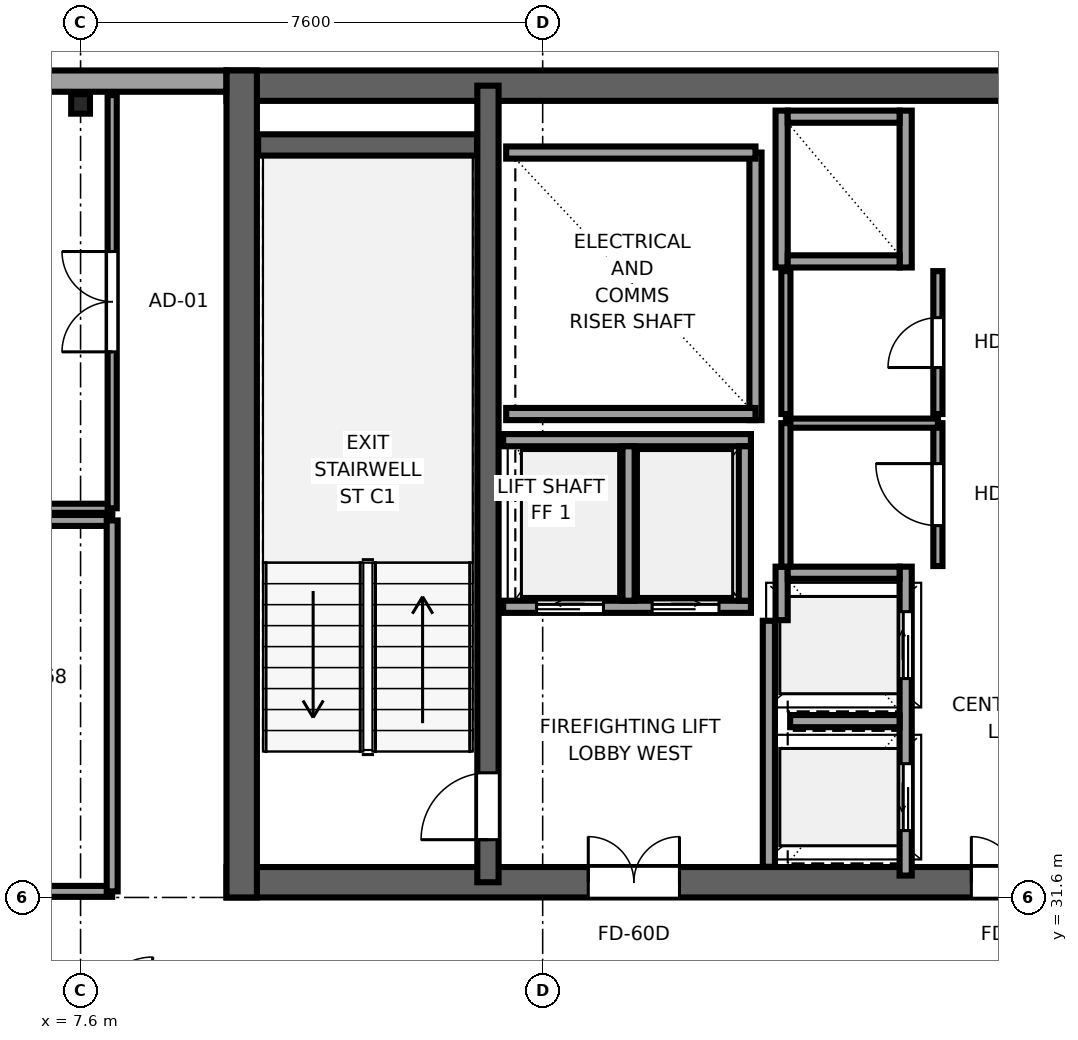
"""IFC4 building model, lengths in metres.
Left out: names, types, materials, properties, quantities, classifications, styles, units other than length and angle.
Written with IfcOpenShell. Run it as: python <this file> out.ifc"""

import sys

from ifc_helpers import new_model, si_unit, direction, frame, frame_2d, origin, origin_2d, place, context, subcontext, project, spatial, rectangle, i_section, extrude, source, transform, mapped, element, fill, save


model = new_model("IFC4")
c1 = context("Model", 3, precision=1e-05, world=origin(), true_north=direction((0.0, 1.0)))
c2 = subcontext(c1, "Body", "Model", "MODEL_VIEW")
j1 = project(units=[si_unit("LENGTHUNIT", "METRE"), si_unit("PLANEANGLEUNIT", "RADIAN")], contexts=[c1])
p1 = place(None, origin())
s1 = spatial("IfcSite", under=j1, at=p1, CompositionType="ELEMENT")
p2 = place(p1, origin())
s2 = spatial("IfcBuilding", under=s1, at=p2, CompositionType="ELEMENT")
p3 = place(p2, frame((0.0, 0.0, 255.85)))
s3 = spatial("IfcBuildingStorey", under=s2, at=p3, CompositionType="ELEMENT", Elevation=255.85)
p4 = place(p3, frame((10.0, 31.85, 0.0), z_axis=(0.0, 0.0, 1.0), x_axis=(1.0, 0.0, 0.0)))
e1 = element("IfcWall", 1, at=p4, inside=s3, PredefinedType="SHEAR", context=c2, shape_type="SweptSolid", body=[
    extrude(rectangle(XDim=26.0, YDim=0.5, at=frame_2d((13.0, 0.0))), origin(), (0.0, 0.0, 1.0), 3.55),
])
p5 = place(p4, frame((7.45, 0.0, 0.0), z_axis=(0.0, 0.0, 1.0), x_axis=(-1.0, 0.0, 0.0)))
e2 = element("IfcOpeningElement", 2, at=p5, cuts=e1, PredefinedType="OPENING", context=c2, shape_type="SweptSolid", body=[
    extrude(rectangle(XDim=1.5, YDim=2.04, at=frame_2d((0.75, 1.02))), frame((0.0, 0.26, 0.0), z_axis=(0.0, -1.0, 0.0), x_axis=(1.0, 0.0, 0.0)), (0.0, 0.0, 1.0), 0.52),
])
p6 = place(p4, frame((13.75, 0.0, 0.0), z_axis=(0.0, 0.0, 1.0), x_axis=(-1.0, 0.0, 0.0)))
e3 = element("IfcOpeningElement", 3, at=p6, cuts=e1, PredefinedType="OPENING", context=c2, shape_type="SweptSolid", body=[
    extrude(rectangle(XDim=1.5, YDim=2.04, at=frame_2d((0.75, 1.02))), frame((0.0, 0.26, 0.0), z_axis=(0.0, -1.0, 0.0), x_axis=(1.0, 0.0, 0.0)), (0.0, 0.0, 1.0), 0.52),
])
p7 = place(p4, frame((20.05, 0.0, 0.0), z_axis=(0.0, 0.0, 1.0), x_axis=(-1.0, 0.0, 0.0)))
e4 = element("IfcOpeningElement", 4, at=p7, cuts=e1, PredefinedType="OPENING", context=c2, shape_type="SweptSolid", body=[
    extrude(rectangle(XDim=1.5, YDim=2.04, at=frame_2d((0.75, 1.02))), frame((0.0, 0.26, 0.0), z_axis=(0.0, -1.0, 0.0), x_axis=(1.0, 0.0, 0.0)), (0.0, 0.0, 1.0), 0.52),
])
p8 = place(p3, frame((10.0, 44.95, 0.0), z_axis=(0.0, 0.0, 1.0), x_axis=(1.0, 0.0, 0.0)))
e5 = element("IfcWall", 5, at=p8, inside=s3, PredefinedType="SHEAR", context=c2, shape_type="SweptSolid", body=[
    extrude(rectangle(XDim=26.0, YDim=0.5, at=frame_2d((13.0, 0.0))), origin(), (0.0, 0.0, 1.0), 3.55),
])
p9 = place(p3, frame((10.25, 31.6, 0.0), z_axis=(0.0, 0.0, 1.0), x_axis=(0.0, 1.0, 0.0)))
e6 = element("IfcWall", 6, at=p9, inside=s3, PredefinedType="SHEAR", context=c2, shape_type="SweptSolid", body=[
    extrude(rectangle(XDim=13.6, YDim=0.5, at=frame_2d((6.8, 0.0))), origin(), (0.0, 0.0, 1.0), 3.55),
])
p10 = place(p3, frame((14.3, 31.85, 0.0), z_axis=(0.0, 0.0, 1.0), x_axis=(0.0, 1.0, 0.0)))
e7 = element("IfcWall", 7, at=p10, inside=s3, PredefinedType="SHEAR", context=c2, shape_type="SweptSolid", body=[
    extrude(rectangle(XDim=13.1, YDim=0.35, at=frame_2d((6.55, 0.0))), origin(), (0.0, 0.0, 1.0), 3.55),
])
p11 = place(p10, frame((0.7, 0.0, 0.0)))
e8 = element("IfcOpeningElement", 8, at=p11, cuts=e7, PredefinedType="OPENING", context=c2, shape_type="SweptSolid", body=[
    extrude(rectangle(XDim=1.1, YDim=2.12, at=frame_2d((0.55, 1.06))), frame((0.0, 0.185, 0.0), z_axis=(0.0, -1.0, 0.0), x_axis=(1.0, 0.0, 0.0)), (0.0, 0.0, 1.0), 0.37),
])
p12 = place(p3, frame((10.52, 43.975, 0.0), z_axis=(0.0, 0.0, 1.0), x_axis=(1.0, 0.0, 0.0)))
e9 = element("IfcWall", 9, at=p12, inside=s3, PredefinedType="SHEAR", context=c2, shape_type="SweptSolid", body=[
    extrude(rectangle(XDim=3.6, YDim=0.35, at=frame_2d((1.8, 0.0))), origin(), (0.0, 0.0, 1.0), 3.55),
])
m1 = source(origin(), c2, "Body", "SweptSolid", [
    extrude(i_section(OverallWidth=0.309, OverallDepth=0.321, WebThickness=0.014, FlangeThickness=0.022, FilletRadius=0.017, at=origin_2d()), origin(), (0.0, 0.0, 1.0), 3.55),
])
p13 = place(p3, frame((7.6, 44.65, 0.0), z_axis=(0.0, 0.0, 1.0), x_axis=(1.0, 0.0, 0.0)))
e10 = element("IfcColumn", 10, at=p13, inside=s3, PredefinedType="COLUMN", context=c2, shape_type="MappedRepresentation", body=[
    mapped(m1, transform((0.0, 0.0, 0.0), x_axis=(1.0, 0.0, 0.0), y_axis=(0.0, 1.0, 0.0), z_axis=(0.0, 0.0, 1.0), scale=1.0)),
])
p14 = place(p3, frame((9.996, 45.025, 0.0), z_axis=(0.0, 0.0, 1.0), x_axis=(-1.0, 0.0, 0.0)))
e11 = element("IfcWall", 11, at=p14, inside=s3, PredefinedType="SOLIDWALL", context=c2, shape_type="SweptSolid", body=[
    extrude(rectangle(XDim=2.979, YDim=0.35, at=frame_2d((1.49, 0.0))), origin(), (0.0, 0.0, 1.0), 2.16),
])
p15 = place(p3, frame((18.7, 39.45, 0.0), z_axis=(0.0, 0.0, 1.0), x_axis=(0.0, 1.0, 0.0)))
e12 = element("IfcWall", 12, at=p15, inside=s3, PredefinedType="SOLIDWALL", context=c2, shape_type="SweptSolid", body=[
    extrude(rectangle(XDim=4.4, YDim=0.2, at=frame_2d((2.2, 0.0))), origin(), (0.0, 0.0, 1.0), 3.37),
])
for number, where, z_axis, x_axis in (
    (13, (14.6, 39.55, 0.0), (0.0, 0.0, 1.0), (1.0, 0.0, 0.0)),
    (14, (14.6, 43.85, 0.0), (0.0, 0.0, 1.0), (1.0, 0.0, 0.0)),
):
    element("IfcWall", number, at=place(p3, frame(where, z_axis=z_axis, x_axis=x_axis)), inside=s3, PredefinedType="SOLIDWALL", context=c2, shape_type="SweptSolid", body=[
        extrude(rectangle(XDim=4.1, YDim=0.2, at=frame_2d((2.05, 0.0))), origin(), (0.0, 0.0, 1.0), 3.37),
    ])
p16 = place(p3, frame((18.92, 32.104, 0.0), z_axis=(0.0, 0.0, 1.0), x_axis=(0.0, 1.0, 0.0)))
e15 = element("IfcWall", 15, at=p16, inside=s3, PredefinedType="SOLIDWALL", context=c2, shape_type="SweptSolid", body=[
    extrude(rectangle(XDim=4.046, YDim=0.2, at=frame_2d((2.023, 0.0))), origin(), (0.0, 0.0, 1.0), 3.37),
])
p17 = place(p3, frame((21.17, 31.96, 0.0), z_axis=(0.0, 0.0, 1.0), x_axis=(0.0, 1.0, 0.0)))
e16 = element("IfcWall", 16, at=p17, inside=s3, PredefinedType="SOLIDWALL", context=c2, shape_type="SweptSolid", body=[
    extrude(rectangle(XDim=5.08, YDim=0.2, at=frame_2d((2.54, 0.0))), origin(), (0.0, 0.0, 1.0), 3.37),
])
p18 = place(p17, frame((0.74, 0.0, 0.0)))
e17 = element("IfcOpeningElement", 17, at=p18, cuts=e16, PredefinedType="OPENING", context=c2, shape_type="SweptSolid", body=[
    extrude(rectangle(XDim=1.1, YDim=2.12, at=frame_2d((0.55, 1.06))), frame((0.0, 0.11, 0.0), z_axis=(0.0, -1.0, 0.0), x_axis=(1.0, 0.0, 0.0)), (0.0, 0.0, 1.0), 0.22),
])
p19 = place(p17, frame((3.24, 0.0, 0.0)))
e18 = element("IfcOpeningElement", 18, at=p19, cuts=e16, PredefinedType="OPENING", context=c2, shape_type="SweptSolid", body=[
    extrude(rectangle(XDim=1.1, YDim=2.12, at=frame_2d((0.55, 1.06))), frame((0.0, 0.11, 0.0), z_axis=(0.0, -1.0, 0.0), x_axis=(1.0, 0.0, 0.0)), (0.0, 0.0, 1.0), 0.22),
])
p20 = place(p3, frame((19.13, 36.16, 0.0), z_axis=(0.0, 0.0, 1.0), x_axis=(0.0, 1.0, 0.0)))
e19 = element("IfcWall", 19, at=p20, inside=s3, PredefinedType="SOLIDWALL", context=c2, shape_type="SweptSolid", body=[
    extrude(rectangle(XDim=0.88, YDim=0.2, at=frame_2d((0.44, 0.0))), origin(), (0.0, 0.0, 1.0), 3.37),
])
p21 = place(p3, frame((19.23, 36.94, 0.0), z_axis=(0.0, 0.0, 1.0), x_axis=(1.0, 0.0, 0.0)))
e20 = element("IfcWall", 20, at=p21, inside=s3, PredefinedType="SOLIDWALL", context=c2, shape_type="SweptSolid", body=[
    extrude(rectangle(XDim=1.84, YDim=0.2, at=frame_2d((0.92, 0.0))), origin(), (0.0, 0.0, 1.0), 3.37),
])
p22 = place(p3, frame((19.27, 34.5, 0.0), z_axis=(0.0, 0.0, 1.0), x_axis=(1.0, 0.0, 0.0)))
e21 = element("IfcWall", 21, at=p22, inside=s3, PredefinedType="SOLIDWALL", context=c2, shape_type="SweptSolid", body=[
    extrude(rectangle(XDim=1.8, YDim=0.2, at=frame_2d((0.9, 0.0))), origin(), (0.0, 0.0, 1.0), 3.37),
])
for number, where, z_axis, x_axis in (
    (22, (21.17, 41.96, 0.0), (0.0, 0.0, 1.0), (0.0, 1.0, 0.0)),
    (23, (19.13, 41.96, 0.0), (0.0, 0.0, 1.0), (0.0, 1.0, 0.0)),
):
    element("IfcWall", number, at=place(p3, frame(where, z_axis=z_axis, x_axis=x_axis)), inside=s3, PredefinedType="SOLIDWALL", context=c2, shape_type="SweptSolid", body=[
        extrude(rectangle(XDim=2.58, YDim=0.2, at=frame_2d((1.29, 0.0))), origin(), (0.0, 0.0, 1.0), 3.37),
    ])
for number, where, z_axis, x_axis in (
    (24, (19.23, 42.06, 0.0), (0.0, 0.0, 1.0), (1.0, 0.0, 0.0)),
    (25, (19.23, 44.44, 0.0), (0.0, 0.0, 1.0), (1.0, 0.0, 0.0)),
):
    element("IfcWall", number, at=place(p3, frame(where, z_axis=z_axis, x_axis=x_axis)), inside=s3, PredefinedType="SOLIDWALL", context=c2, shape_type="SweptSolid", body=[
        extrude(rectangle(XDim=1.84, YDim=0.2, at=frame_2d((0.92, 0.0))), origin(), (0.0, 0.0, 1.0), 3.37),
    ])
p23 = place(p3, frame((14.55, 36.38, 0.0), z_axis=(0.0, 0.0, 1.0), x_axis=(1.0, 0.0, 0.0)))
e26 = element("IfcWall", 26, at=p23, inside=s3, PredefinedType="SOLIDWALL", context=c2, shape_type="SweptSolid", body=[
    extrude(rectangle(XDim=4.075, YDim=0.2, at=frame_2d((2.038, 0.0))), origin(), (0.0, 0.0, 1.0), 3.37),
])
p24 = place(p23, frame((0.55, 0.0, 0.0)))
e27 = element("IfcOpeningElement", 27, at=p24, cuts=e26, PredefinedType="OPENING", context=c2, shape_type="SweptSolid", body=[
    extrude(rectangle(XDim=1.1, YDim=2.12, at=frame_2d((0.55, 1.06))), frame((0.0, 0.11, 0.0), z_axis=(0.0, -1.0, 0.0), x_axis=(1.0, 0.0, 0.0)), (0.0, 0.0, 1.0), 0.22),
])
p25 = place(p23, frame((2.45, 0.0, 0.0)))
e28 = element("IfcOpeningElement", 28, at=p25, cuts=e26, PredefinedType="OPENING", context=c2, shape_type="SweptSolid", body=[
    extrude(rectangle(XDim=1.1, YDim=2.12, at=frame_2d((0.55, 1.06))), frame((0.0, 0.11, 0.0), z_axis=(0.0, -1.0, 0.0), x_axis=(1.0, 0.0, 0.0)), (0.0, 0.0, 1.0), 0.22),
])
p26 = place(p3, frame((14.55, 39.12, 0.0), z_axis=(0.0, 0.0, 1.0), x_axis=(1.0, 0.0, 0.0)))
e29 = element("IfcWall", 29, at=p26, inside=s3, PredefinedType="SOLIDWALL", context=c2, shape_type="SweptSolid", body=[
    extrude(rectangle(XDim=4.075, YDim=0.2, at=frame_2d((2.038, 0.0))), origin(), (0.0, 0.0, 1.0), 3.37),
])
for number, where, z_axis, x_axis in (
    (30, (18.525, 36.48, 0.0), (0.0, 0.0, 1.0), (0.0, 1.0, 0.0)),
    (31, (16.613, 36.48, 0.0), (0.0, 0.0, 1.0), (0.0, 1.0, 0.0)),
):
    element("IfcWall", number, at=place(p3, frame(where, z_axis=z_axis, x_axis=x_axis)), inside=s3, PredefinedType="SOLIDWALL", context=c2, shape_type="SweptSolid", body=[
        extrude(rectangle(XDim=2.54, YDim=0.2, at=frame_2d((1.27, 0.0))), origin(), (0.0, 0.0, 1.0), 3.37),
    ])
p27 = place(p3, frame((21.7, 37.05, 0.0), z_axis=(0.0, 0.0, 1.0), x_axis=(0.0, 1.0, 0.0)))
e32 = element("IfcWall", 32, at=p27, inside=s3, PredefinedType="PARTITIONING", context=c2, shape_type="SweptSolid", body=[
    extrude(rectangle(XDim=2.35, YDim=0.15, at=frame_2d((1.175, 0.0))), origin(), (0.0, 0.0, 1.0), 3.37),
])
p28 = place(p27, frame((0.665, 0.0, 0.0)))
e33 = element("IfcOpeningElement", 33, at=p28, cuts=e32, PredefinedType="OPENING", context=c2, shape_type="SweptSolid", body=[
    extrude(rectangle(XDim=1.02, YDim=2.03, at=frame_2d((0.51, 1.015))), frame((0.0, 0.085, 0.0), z_axis=(0.0, -1.0, 0.0), x_axis=(1.0, 0.0, 0.0)), (0.0, 0.0, 1.0), 0.17),
])
p29 = place(p3, frame((19.2, 39.4, 0.0), z_axis=(0.0, 0.0, 1.0), x_axis=(1.0, 0.0, 0.0)))
e34 = element("IfcWall", 34, at=p29, inside=s3, PredefinedType="PARTITIONING", context=c2, shape_type="SweptSolid", body=[
    extrude(rectangle(XDim=2.5, YDim=0.15, at=frame_2d((1.25, 0.0))), origin(), (0.0, 0.0, 1.0), 3.37),
])
p30 = place(p3, frame((19.2, 37.04, 0.0), z_axis=(0.0, 0.0, 1.0), x_axis=(0.0, 1.0, 0.0)))
e35 = element("IfcWall", 35, at=p30, inside=s3, PredefinedType="PARTITIONING", context=c2, shape_type="SweptSolid", body=[
    extrude(rectangle(XDim=2.36, YDim=0.15, at=frame_2d((1.18, 0.0))), origin(), (0.0, 0.0, 1.0), 3.37),
])
p31 = place(p3, frame((21.7, 39.55, 0.0), z_axis=(0.0, 0.0, 1.0), x_axis=(0.0, 1.0, 0.0)))
e36 = element("IfcWall", 36, at=p31, inside=s3, PredefinedType="PARTITIONING", context=c2, shape_type="SweptSolid", body=[
    extrude(rectangle(XDim=2.35, YDim=0.15, at=frame_2d((1.175, 0.0))), origin(), (0.0, 0.0, 1.0), 3.37),
])
p32 = place(p31, frame((0.765, 0.0, 0.0)))
e37 = element("IfcOpeningElement", 37, at=p32, cuts=e36, PredefinedType="OPENING", context=c2, shape_type="SweptSolid", body=[
    extrude(rectangle(XDim=0.82, YDim=2.01, at=frame_2d((0.41, 1.005))), frame((0.0, 0.085, 0.0), z_axis=(0.0, -1.0, 0.0), x_axis=(1.0, 0.0, 0.0)), (0.0, 0.0, 1.0), 0.17),
])
p33 = place(p3, frame((19.2, 39.55, 0.0), z_axis=(0.0, 0.0, 1.0), x_axis=(0.0, 1.0, 0.0)))
e38 = element("IfcWall", 38, at=p33, inside=s3, PredefinedType="PARTITIONING", context=c2, shape_type="SweptSolid", body=[
    extrude(rectangle(XDim=2.35, YDim=0.15, at=frame_2d((1.175, 0.0))), origin(), (0.0, 0.0, 1.0), 3.37),
])
p34 = place(p3, frame((3.005, 31.7, 0.0), z_axis=(0.0, 0.0, 1.0), x_axis=(1.0, 0.0, 0.0)))
e39 = element("IfcWall", 39, at=p34, inside=s3, PredefinedType="PARTITIONING", context=c2, shape_type="SweptSolid", body=[
    extrude(rectangle(XDim=5.115, YDim=0.18, at=frame_2d((2.558, 0.0))), origin(), (0.0, 0.0, 1.0), 3.37),
])
p35 = place(p34, frame((1.732, 0.0, 0.0)))
e40 = element("IfcOpeningElement", 40, at=p35, cuts=e39, PredefinedType="OPENING", context=c2, shape_type="SweptSolid", body=[
    extrude(rectangle(XDim=1.65, YDim=2.15, at=frame_2d((0.825, 1.075))), frame((0.0, 0.1, 0.0), z_axis=(0.0, -1.0, 0.0), x_axis=(1.0, 0.0, 0.0)), (0.0, 0.0, 1.0), 0.2),
])
p36 = place(p3, frame((3.005, 37.8, 0.0), z_axis=(0.0, 0.0, 1.0), x_axis=(1.0, 0.0, 0.0)))
e41 = element("IfcWall", 41, at=p36, inside=s3, PredefinedType="PARTITIONING", context=c2, shape_type="SweptSolid", body=[
    extrude(rectangle(XDim=5.115, YDim=0.18, at=frame_2d((2.558, 0.0))), origin(), (0.0, 0.0, 1.0), 3.37),
])
p37 = place(p3, frame((8.12, 31.7, 0.0), z_axis=(0.0, 0.0, 1.0), x_axis=(0.0, 1.0, 0.0)))
e42 = element("IfcWall", 42, at=p37, inside=s3, PredefinedType="PARTITIONING", context=c2, shape_type="SweptSolid", body=[
    extrude(rectangle(XDim=6.1, YDim=0.18, at=frame_2d((3.05, 0.0))), origin(), (0.0, 0.0, 1.0), 3.37),
])
p38 = place(p3, frame((3.005, 38.0, 0.0), z_axis=(0.0, 0.0, 1.0), x_axis=(1.0, 0.0, 0.0)))
e43 = element("IfcWall", 43, at=p38, inside=s3, PredefinedType="PARTITIONING", context=c2, shape_type="SweptSolid", body=[
    extrude(rectangle(XDim=5.115, YDim=0.15, at=frame_2d((2.558, 0.0))), origin(), (0.0, 0.0, 1.0), 3.37),
])
p39 = place(p3, frame((8.12, 38.0, 0.0), z_axis=(0.0, 0.0, 1.0), x_axis=(0.0, 1.0, 0.0)))
e44 = element("IfcWall", 44, at=p39, inside=s3, PredefinedType="PARTITIONING", context=c2, shape_type="SweptSolid", body=[
    extrude(rectangle(XDim=6.795, YDim=0.15, at=frame_2d((3.397, 0.0))), origin(), (0.0, 0.0, 1.0), 3.37),
])
p40 = place(p39, frame((2.573, 0.0, 0.0)))
e45 = element("IfcOpeningElement", 45, at=p40, cuts=e44, PredefinedType="OPENING", context=c2, shape_type="SweptSolid", body=[
    extrude(rectangle(XDim=1.65, YDim=2.15, at=frame_2d((0.825, 1.075))), frame((0.0, 0.085, 0.0), z_axis=(0.0, -1.0, 0.0), x_axis=(1.0, 0.0, 0.0)), (0.0, 0.0, 1.0), 0.17),
])
m2 = source(origin(), c2, "Body", "SweptSolid", [
    extrude(rectangle(XDim=1.1, YDim=2.12, at=frame_2d((0.55, 1.06))), frame((0.0, 0.025, 0.0), z_axis=(0.0, -1.0, 0.0), x_axis=(1.0, 0.0, 0.0)), (0.0, 0.0, 1.0), 0.05),
])
p41 = place(p11, origin())
e46 = element("IfcDoor", 46, at=p41, inside=s3, OperationType="SINGLE_SWING_LEFT", PredefinedType="DOOR", context=c2, shape_type="MappedRepresentation", body=[
    mapped(m2, transform((0.0, 0.0, 0.0), x_axis=(1.0, 0.0, 0.0), y_axis=(0.0, 1.0, 0.0), z_axis=(0.0, 0.0, 1.0), scale=1.0)),
])
fill(e8, e46)
m3 = source(origin(), c2, "Body", "SweptSolid", [
    extrude(rectangle(XDim=1.5, YDim=2.04, at=frame_2d((0.75, 1.02))), frame((0.0, 0.025, 0.0), z_axis=(0.0, -1.0, 0.0), x_axis=(1.0, 0.0, 0.0)), (0.0, 0.0, 1.0), 0.05),
])
p42 = place(p5, origin())
e47 = element("IfcDoor", 47, at=p42, inside=s3, OperationType="DOUBLE_DOOR_SINGLE_SWING", PredefinedType="DOOR", context=c2, shape_type="MappedRepresentation", body=[
    mapped(m3, transform((0.0, 0.0, 0.0), x_axis=(1.0, 0.0, 0.0), y_axis=(0.0, 1.0, 0.0), z_axis=(0.0, 0.0, 1.0), scale=1.0)),
])
fill(e2, e47)
p43 = place(p6, origin())
e48 = element("IfcDoor", 48, at=p43, inside=s3, OperationType="DOUBLE_DOOR_SINGLE_SWING", PredefinedType="DOOR", context=c2, shape_type="MappedRepresentation", body=[
    mapped(m3, transform((0.0, 0.0, 0.0), x_axis=(1.0, 0.0, 0.0), y_axis=(0.0, 1.0, 0.0), z_axis=(0.0, 0.0, 1.0), scale=1.0)),
])
fill(e3, e48)
m4 = source(origin(), c2, "Body", "SweptSolid", [
    extrude(rectangle(XDim=1.1, YDim=2.12, at=frame_2d((0.55, 1.06))), frame((0.0, 0.025, 0.0), z_axis=(0.0, -1.0, 0.0), x_axis=(1.0, 0.0, 0.0)), (0.0, 0.0, 1.0), 0.05),
])
p44 = place(p18, origin())
e49 = element("IfcDoor", 49, at=p44, inside=s3, OperationType="SLIDING_TO_LEFT", PredefinedType="DOOR", context=c2, shape_type="MappedRepresentation", body=[
    mapped(m4, transform((0.0, 0.0, 0.0), x_axis=(1.0, 0.0, 0.0), y_axis=(0.0, 1.0, 0.0), z_axis=(0.0, 0.0, 1.0), scale=1.0)),
])
fill(e17, e49)
p45 = place(p19, origin())
e50 = element("IfcDoor", 50, at=p45, inside=s3, OperationType="SLIDING_TO_RIGHT", PredefinedType="DOOR", context=c2, shape_type="MappedRepresentation", body=[
    mapped(m4, transform((0.0, 0.0, 0.0), x_axis=(1.0, 0.0, 0.0), y_axis=(0.0, 1.0, 0.0), z_axis=(0.0, 0.0, 1.0), scale=1.0)),
])
fill(e18, e50)
p46 = place(p24, origin())
e51 = element("IfcDoor", 51, at=p46, inside=s3, OperationType="SLIDING_TO_LEFT", PredefinedType="DOOR", context=c2, shape_type="MappedRepresentation", body=[
    mapped(m4, transform((0.0, 0.0, 0.0), x_axis=(1.0, 0.0, 0.0), y_axis=(0.0, 1.0, 0.0), z_axis=(0.0, 0.0, 1.0), scale=1.0)),
])
fill(e27, e51)
p47 = place(p25, origin())
e52 = element("IfcDoor", 52, at=p47, inside=s3, OperationType="SLIDING_TO_RIGHT", PredefinedType="DOOR", context=c2, shape_type="MappedRepresentation", body=[
    mapped(m4, transform((0.0, 0.0, 0.0), x_axis=(1.0, 0.0, 0.0), y_axis=(0.0, 1.0, 0.0), z_axis=(0.0, 0.0, 1.0), scale=1.0)),
])
fill(e28, e52)
m5 = source(origin(), c2, "Body", "SweptSolid", [
    extrude(rectangle(XDim=1.02, YDim=2.03, at=frame_2d((0.51, 1.015))), frame((0.0, 0.025, 0.0), z_axis=(0.0, -1.0, 0.0), x_axis=(1.0, 0.0, 0.0)), (0.0, 0.0, 1.0), 0.05),
])
p48 = place(p28, origin())
e53 = element("IfcDoor", 53, at=p48, inside=s3, OperationType="SINGLE_SWING_RIGHT", PredefinedType="DOOR", context=c2, shape_type="MappedRepresentation", body=[
    mapped(m5, transform((0.0, 0.0, 0.0), x_axis=(1.0, 0.0, 0.0), y_axis=(0.0, 1.0, 0.0), z_axis=(0.0, 0.0, 1.0), scale=1.0)),
])
fill(e33, e53)
m6 = source(origin(), c2, "Body", "SweptSolid", [
    extrude(rectangle(XDim=0.82, YDim=2.01, at=frame_2d((0.41, 1.005))), frame((0.0, 0.025, 0.0), z_axis=(0.0, -1.0, 0.0), x_axis=(1.0, 0.0, 0.0)), (0.0, 0.0, 1.0), 0.05),
])
p49 = place(p32, origin())
e54 = element("IfcDoor", 54, at=p49, inside=s3, OperationType="SINGLE_SWING_LEFT", PredefinedType="DOOR", context=c2, shape_type="MappedRepresentation", body=[
    mapped(m6, transform((0.0, 0.0, 0.0), x_axis=(1.0, 0.0, 0.0), y_axis=(0.0, 1.0, 0.0), z_axis=(0.0, 0.0, 1.0), scale=1.0)),
])
fill(e37, e54)
m7 = source(origin(), c2, "Body", "SweptSolid", [
    extrude(rectangle(XDim=1.65, YDim=2.15, at=frame_2d((0.825, 1.075))), frame((0.0, 0.025, 0.0), z_axis=(0.0, -1.0, 0.0), x_axis=(1.0, 0.0, 0.0)), (0.0, 0.0, 1.0), 0.05),
])
p50 = place(p40, origin())
e55 = element("IfcDoor", 55, at=p50, inside=s3, OperationType="DOUBLE_DOOR_SINGLE_SWING", PredefinedType="DOOR", context=c2, shape_type="MappedRepresentation", body=[
    mapped(m7, transform((0.0, 0.0, 0.0), x_axis=(1.0, 0.0, 0.0), y_axis=(0.0, 1.0, 0.0), z_axis=(0.0, 0.0, 1.0), scale=1.0)),
])
fill(e45, e55)
save(model, sys.argv[1])
